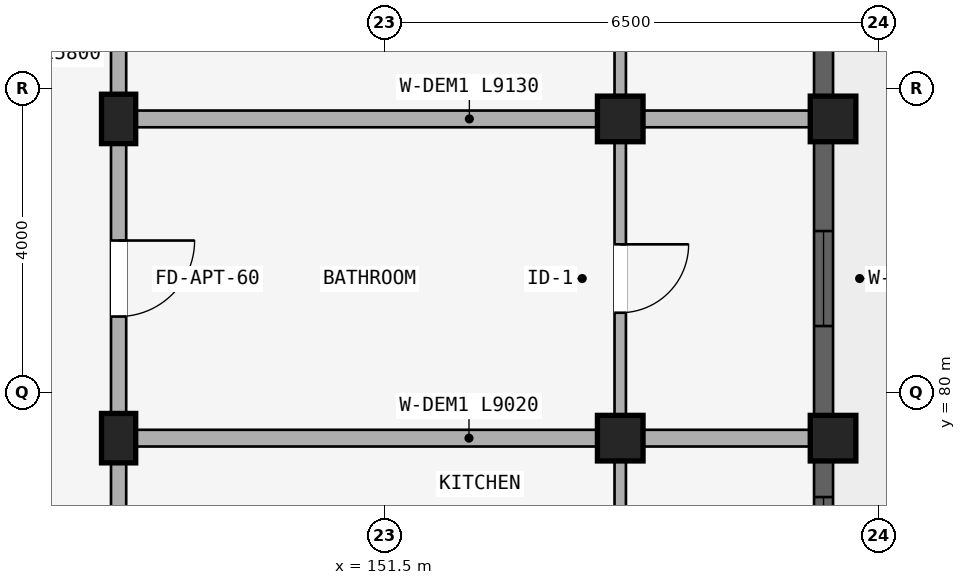
"""IFC4 building model, lengths in metres.
Left out: names, types, materials, properties, quantities, classifications, styles, units other than length and angle.
Written with IfcOpenShell. Run it as: python <this file> out.ifc"""

import sys

from ifc_helpers import new_model, si_unit, direction, frame, frame_2d, origin, origin_2d, place, context, subcontext, project, spatial, rectangle, extrude, element, fill, save


model = new_model("IFC4")
c1 = context("Model", 3, precision=1e-05, world=origin(), true_north=direction((0.0, 1.0)))
c2 = subcontext(c1, "Body", "Model", "MODEL_VIEW")
j1 = project(units=[si_unit("LENGTHUNIT", "METRE"), si_unit("PLANEANGLEUNIT", "RADIAN")], contexts=[c1])
p1 = place(None, origin())
s1 = spatial("IfcSite", under=j1, at=p1, CompositionType="ELEMENT")
p2 = place(p1, origin())
s2 = spatial("IfcBuilding", under=s1, at=p2, CompositionType="ELEMENT")
p3 = place(p2, frame((0.0, 0.0, 37.05)))
s3 = spatial("IfcBuildingStorey", under=s2, at=p3, CompositionType="ELEMENT", Elevation=37.05)
p4 = place(p3, frame((148.0, 83.6, 0.0), z_axis=(0.0, 0.0, 1.0), x_axis=(1.0, 0.0, 0.0)))
e1 = element("IfcColumn", 1, at=p4, inside=s3, PredefinedType="COLUMN", context=c2, shape_type="SweptSolid", body=[
    extrude(rectangle(XDim=0.45, YDim=0.65, at=origin_2d()), origin(), (0.0, 0.0, 1.0), 2.93),
])
p5 = place(p3, frame((154.6, 83.6, 0.0), z_axis=(0.0, 0.0, 1.0), x_axis=(1.0, 0.0, 0.0)))
e2 = element("IfcColumn", 2, at=p5, inside=s3, PredefinedType="COLUMN", context=c2, shape_type="SweptSolid", body=[
    extrude(rectangle(XDim=0.6, YDim=0.6, at=origin_2d()), origin(), (0.0, 0.0, 1.0), 2.93),
])
p6 = place(p3, frame((157.4, 83.6, 0.0), z_axis=(0.0, 0.0, 1.0), x_axis=(1.0, 0.0, 0.0)))
e3 = element("IfcColumn", 3, at=p6, inside=s3, PredefinedType="COLUMN", context=c2, shape_type="SweptSolid", body=[
    extrude(rectangle(XDim=0.6, YDim=0.6, at=origin_2d()), origin(), (0.0, 0.0, 1.0), 2.97),
])
p7 = place(p3, frame((148.0, 79.4, 0.0), z_axis=(0.0, 0.0, 1.0), x_axis=(1.0, 0.0, 0.0)))
e4 = element("IfcColumn", 4, at=p7, inside=s3, PredefinedType="COLUMN", context=c2, shape_type="SweptSolid", body=[
    extrude(rectangle(XDim=0.45, YDim=0.65, at=origin_2d()), origin(), (0.0, 0.0, 1.0), 2.93),
])
p8 = place(p3, frame((154.6, 79.4, 0.0), z_axis=(0.0, 0.0, 1.0), x_axis=(1.0, 0.0, 0.0)))
e5 = element("IfcColumn", 5, at=p8, inside=s3, PredefinedType="COLUMN", context=c2, shape_type="SweptSolid", body=[
    extrude(rectangle(XDim=0.6, YDim=0.6, at=origin_2d()), origin(), (0.0, 0.0, 1.0), 2.93),
])
p9 = place(p3, frame((157.4, 79.4, 0.0), z_axis=(0.0, 0.0, 1.0), x_axis=(1.0, 0.0, 0.0)))
e6 = element("IfcColumn", 6, at=p9, inside=s3, PredefinedType="COLUMN", context=c2, shape_type="SweptSolid", body=[
    extrude(rectangle(XDim=0.6, YDim=0.6, at=origin_2d()), origin(), (0.0, 0.0, 1.0), 2.97),
])
p10 = place(p3, frame((148.0, 87.65, 0.0), z_axis=(0.0, 0.0, 1.0), x_axis=(0.0, -1.0, 0.0)))
e7 = element("IfcWall", 7, at=p10, inside=s3, PredefinedType="STANDARD", context=c2, shape_type="SweptSolid", body=[
    extrude(rectangle(XDim=4.05, YDim=0.2, at=frame_2d((2.025, 0.0))), origin(), (0.0, 0.0, 1.0), 2.372),
])
p11 = place(p10, frame((1.525, 0.0, 0.0)))
e8 = element("IfcOpeningElement", 8, at=p11, cuts=e7, PredefinedType="OPENING", context=c2, shape_type="SweptSolid", body=[
    extrude(rectangle(XDim=1.0, YDim=2.15, at=frame_2d((0.5, 1.075))), frame((0.0, 0.11, 0.0), z_axis=(0.0, -1.0, 0.0), x_axis=(1.0, 0.0, 0.0)), (0.0, 0.0, 1.0), 0.22),
])
p12 = place(p3, frame((154.6, 87.57, 0.0), z_axis=(0.0, 0.0, 1.0), x_axis=(0.0, -1.0, 0.0)))
e9 = element("IfcWall", 9, at=p12, inside=s3, PredefinedType="PARTITIONING", context=c2, shape_type="SweptSolid", body=[
    extrude(rectangle(XDim=3.89, YDim=0.15, at=frame_2d((1.945, 0.0))), origin(), (0.0, 0.0, 1.0), 2.372),
])
p13 = place(p12, frame((1.495, 0.0, 0.0)))
e10 = element("IfcOpeningElement", 10, at=p13, cuts=e9, PredefinedType="OPENING", context=c2, shape_type="SweptSolid", body=[
    extrude(rectangle(XDim=0.9, YDim=2.1, at=frame_2d((0.45, 1.05))), frame((0.0, 0.085, 0.0), z_axis=(0.0, -1.0, 0.0), x_axis=(1.0, 0.0, 0.0)), (0.0, 0.0, 1.0), 0.17),
])
p14 = place(p3, frame((148.0, 83.6, 0.0), z_axis=(0.0, 0.0, 1.0), x_axis=(0.0, -1.0, 0.0)))
e11 = element("IfcWall", 11, at=p14, inside=s3, PredefinedType="STANDARD", context=c2, shape_type="SweptSolid", body=[
    extrude(rectangle(XDim=4.2, YDim=0.2, at=frame_2d((2.1, 0.0))), origin(), (0.0, 0.0, 1.0), 2.372),
])
p15 = place(p14, frame((1.6, 0.0, 0.0)))
e12 = element("IfcOpeningElement", 12, at=p15, cuts=e11, PredefinedType="OPENING", context=c2, shape_type="SweptSolid", body=[
    extrude(rectangle(XDim=1.0, YDim=2.15, at=frame_2d((0.5, 1.075))), frame((0.0, 0.11, 0.0), z_axis=(0.0, -1.0, 0.0), x_axis=(1.0, 0.0, 0.0)), (0.0, 0.0, 1.0), 0.22),
])
p16 = place(p3, frame((154.6, 83.52, 0.0), z_axis=(0.0, 0.0, 1.0), x_axis=(0.0, -1.0, 0.0)))
e13 = element("IfcWall", 13, at=p16, inside=s3, PredefinedType="PARTITIONING", context=c2, shape_type="SweptSolid", body=[
    extrude(rectangle(XDim=4.04, YDim=0.15, at=frame_2d((2.02, 0.0))), origin(), (0.0, 0.0, 1.0), 2.372),
])
p17 = place(p16, frame((1.57, 0.0, 0.0)))
e14 = element("IfcOpeningElement", 14, at=p17, cuts=e13, PredefinedType="OPENING", context=c2, shape_type="SweptSolid", body=[
    extrude(rectangle(XDim=0.9, YDim=2.1, at=frame_2d((0.45, 1.05))), frame((0.0, 0.085, 0.0), z_axis=(0.0, -1.0, 0.0), x_axis=(1.0, 0.0, 0.0)), (0.0, 0.0, 1.0), 0.17),
])
p18 = place(p3, frame((148.05, 83.6, 0.0), z_axis=(0.0, 0.0, 1.0), x_axis=(1.0, 0.0, 0.0)))
e15 = element("IfcWall", 15, at=p18, inside=s3, PredefinedType="STANDARD", context=c2, shape_type="SweptSolid", body=[
    extrude(rectangle(XDim=9.13, YDim=0.22, at=frame_2d((4.565, 0.0))), origin(), (0.0, 0.0, 1.0), 2.372),
])
p19 = place(p3, frame((148.0, 79.4, 0.0), z_axis=(0.0, 0.0, 1.0), x_axis=(0.0, -1.0, 0.0)))
e16 = element("IfcWall", 16, at=p19, inside=s3, PredefinedType="STANDARD", context=c2, shape_type="SweptSolid", body=[
    extrude(rectangle(XDim=2.8, YDim=0.2, at=frame_2d((1.4, 0.0))), origin(), (0.0, 0.0, 1.0), 2.372),
])
p20 = place(p19, frame((0.9, 0.0, 0.0)))
e17 = element("IfcOpeningElement", 17, at=p20, cuts=e16, PredefinedType="OPENING", context=c2, shape_type="SweptSolid", body=[
    extrude(rectangle(XDim=1.0, YDim=2.15, at=frame_2d((0.5, 1.075))), frame((0.0, 0.11, 0.0), z_axis=(0.0, -1.0, 0.0), x_axis=(1.0, 0.0, 0.0)), (0.0, 0.0, 1.0), 0.22),
])
p21 = place(p3, frame((154.6, 79.32, 0.0), z_axis=(0.0, 0.0, 1.0), x_axis=(0.0, -1.0, 0.0)))
e18 = element("IfcWall", 18, at=p21, inside=s3, PredefinedType="PLUMBINGWALL", context=c2, shape_type="SweptSolid", body=[
    extrude(rectangle(XDim=2.64, YDim=0.15, at=frame_2d((1.32, 0.0))), origin(), (0.0, 0.0, 1.0), 2.372),
])
p22 = place(p21, frame((0.87, 0.0, 0.0)))
e19 = element("IfcOpeningElement", 19, at=p22, cuts=e18, PredefinedType="OPENING", context=c2, shape_type="SweptSolid", body=[
    extrude(rectangle(XDim=0.9, YDim=2.1, at=frame_2d((0.45, 1.05))), frame((0.0, 0.085, 0.0), z_axis=(0.0, -1.0, 0.0), x_axis=(1.0, 0.0, 0.0)), (0.0, 0.0, 1.0), 0.17),
])
p23 = place(p3, frame((148.1, 79.4, 0.0), z_axis=(0.0, 0.0, 1.0), x_axis=(1.0, 0.0, 0.0)))
e20 = element("IfcWall", 20, at=p23, inside=s3, PredefinedType="STANDARD", context=c2, shape_type="SweptSolid", body=[
    extrude(rectangle(XDim=9.02, YDim=0.22, at=frame_2d((4.51, 0.0))), origin(), (0.0, 0.0, 1.0), 2.372),
])
p24 = place(p3, frame((157.275, 87.497, 0.0), z_axis=(0.0, 0.0, 1.0), x_axis=(0.0, -1.0, 0.0)))
e21 = element("IfcWall", 21, at=p24, inside=s3, PredefinedType="STANDARD", context=c2, shape_type="SweptSolid", body=[
    extrude(rectangle(XDim=3.593, YDim=0.25, at=frame_2d((1.796, 0.0))), origin(), (0.0, 0.0, 1.0), 2.48),
])
p25 = place(p24, frame((1.171, 0.0, 0.73)))
e22 = element("IfcOpeningElement", 22, at=p25, cuts=e21, PredefinedType="OPENING", context=c2, shape_type="SweptSolid", body=[
    extrude(rectangle(XDim=1.25, YDim=1.55, at=frame_2d((0.625, 0.775))), frame((0.0, 0.135, 0.0), z_axis=(0.0, -1.0, 0.0), x_axis=(1.0, 0.0, 0.0)), (0.0, 0.0, 1.0), 0.27),
])
p26 = place(p3, frame((157.275, 83.296, 0.0), z_axis=(0.0, 0.0, 1.0), x_axis=(0.0, -1.0, 0.0)))
e23 = element("IfcWall", 23, at=p26, inside=s3, PredefinedType="STANDARD", context=c2, shape_type="SweptSolid", body=[
    extrude(rectangle(XDim=3.593, YDim=0.25, at=frame_2d((1.796, 0.0))), origin(), (0.0, 0.0, 1.0), 2.48),
])
p27 = place(p26, frame((1.171, 0.0, 0.73)))
e24 = element("IfcOpeningElement", 24, at=p27, cuts=e23, PredefinedType="OPENING", context=c2, shape_type="SweptSolid", body=[
    extrude(rectangle(XDim=1.25, YDim=1.55, at=frame_2d((0.625, 0.775))), frame((0.0, 0.135, 0.0), z_axis=(0.0, -1.0, 0.0), x_axis=(1.0, 0.0, 0.0)), (0.0, 0.0, 1.0), 0.27),
])
p28 = place(p3, frame((157.275, 79.096, 0.0), z_axis=(0.0, 0.0, 1.0), x_axis=(0.0, -1.0, 0.0)))
e25 = element("IfcWall", 25, at=p28, inside=s3, PredefinedType="STANDARD", context=c2, shape_type="SweptSolid", body=[
    extrude(rectangle(XDim=2.193, YDim=0.25, at=frame_2d((1.096, 0.0))), origin(), (0.0, 0.0, 1.0), 2.48),
])
p29 = place(p28, frame((0.471, 0.0, 0.73)))
e26 = element("IfcOpeningElement", 26, at=p29, cuts=e25, PredefinedType="OPENING", context=c2, shape_type="SweptSolid", body=[
    extrude(rectangle(XDim=1.25, YDim=1.55, at=frame_2d((0.625, 0.775))), frame((0.0, 0.135, 0.0), z_axis=(0.0, -1.0, 0.0), x_axis=(1.0, 0.0, 0.0)), (0.0, 0.0, 1.0), 0.27),
])
p30 = place(p27, origin())
e27 = element("IfcWindow", 27, at=p30, inside=s3, PartitioningType="SINGLE_PANEL", PredefinedType="WINDOW", context=c2, shape_type="SweptSolid", body=[
    extrude(rectangle(XDim=1.25, YDim=1.55, at=frame_2d((0.625, 0.775))), frame((0.0, 0.03, 0.0), z_axis=(0.0, -1.0, 0.0), x_axis=(1.0, 0.0, 0.0)), (0.0, 0.0, 1.0), 0.06),
])
fill(e24, e27)
p31 = place(p29, origin())
e28 = element("IfcWindow", 28, at=p31, inside=s3, PartitioningType="SINGLE_PANEL", PredefinedType="WINDOW", context=c2, shape_type="SweptSolid", body=[
    extrude(rectangle(XDim=1.25, YDim=1.55, at=frame_2d((0.625, 0.775))), frame((0.0, 0.03, 0.0), z_axis=(0.0, -1.0, 0.0), x_axis=(1.0, 0.0, 0.0)), (0.0, 0.0, 1.0), 0.06),
])
fill(e26, e28)
p32 = place(p15, frame((1.0, 0.0, 0.0), z_axis=(0.0, 0.0, 1.0), x_axis=(-1.0, 0.0, 0.0)))
e29 = element("IfcDoor", 29, at=p32, inside=s3, OperationType="SINGLE_SWING_RIGHT", PredefinedType="DOOR", context=c2, shape_type="SweptSolid", body=[
    extrude(rectangle(XDim=1.0, YDim=2.15, at=frame_2d((0.5, 1.075))), frame((0.0, 0.025, 0.0), z_axis=(0.0, -1.0, 0.0), x_axis=(1.0, 0.0, 0.0)), (0.0, 0.0, 1.0), 0.05),
])
fill(e12, e29)
p33 = place(p17, origin())
e30 = element("IfcDoor", 30, at=p33, inside=s3, OperationType="SINGLE_SWING_LEFT", PredefinedType="DOOR", context=c2, shape_type="SweptSolid", body=[
    extrude(rectangle(XDim=0.9, YDim=2.1, at=frame_2d((0.45, 1.05))), frame((0.0, 0.025, 0.0), z_axis=(0.0, -1.0, 0.0), x_axis=(1.0, 0.0, 0.0)), (0.0, 0.0, 1.0), 0.05),
])
fill(e14, e30)
save(model, sys.argv[1])
